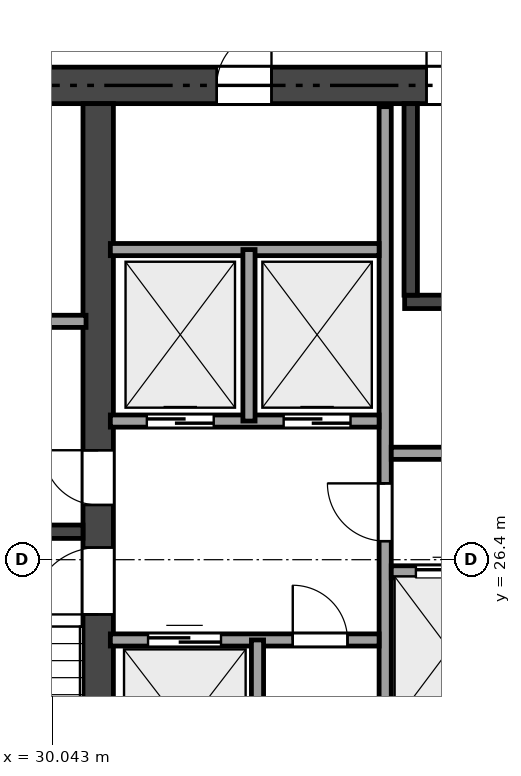
"""IFC4 building model, lengths in metres.
Left out: names, types, materials, properties, quantities, classifications, styles, units other than length and angle.
Written with IfcOpenShell. Run it as: python <this file> out.ifc"""

import sys

from ifc_helpers import new_model, si_unit, direction, frame, frame_2d, origin, place, context, subcontext, project, spatial, rectangle, extrude, element, fill, save


model = new_model("IFC4")
c1 = context("Model", 3, precision=1e-05, world=origin(), true_north=direction((0.0, 1.0)))
c2 = subcontext(c1, "Body", "Model", "MODEL_VIEW")
j1 = project(units=[si_unit("LENGTHUNIT", "METRE"), si_unit("PLANEANGLEUNIT", "RADIAN")], contexts=[c1])
p1 = place(None, origin())
s1 = spatial("IfcSite", under=j1, at=p1, CompositionType="ELEMENT")
p2 = place(p1, origin())
s2 = spatial("IfcBuilding", under=s1, at=p2, CompositionType="ELEMENT")
p3 = place(p2, frame((0.0, 0.0, 125.7)))
s3 = spatial("IfcBuildingStorey", under=s2, at=p3, CompositionType="ELEMENT", Elevation=125.7)
p4 = place(p3, frame((26.5, 34.2, 0.0), z_axis=(0.0, 0.0, 1.0), x_axis=(1.0, 0.0, 0.0)))
e1 = element("IfcWall", 1, at=p4, inside=s3, PredefinedType="SHEAR", context=c2, shape_type="SweptSolid", body=[
    extrude(rectangle(XDim=21.4, YDim=0.6, at=frame_2d((10.7, 0.0))), origin(), (0.0, 0.0, 1.0), 3.32),
])
p5 = place(p4, frame((9.7, 0.0, 0.0)))
e2 = element("IfcOpeningElement", 2, at=p5, cuts=e1, PredefinedType="OPENING", context=c2, shape_type="SweptSolid", body=[
    extrude(rectangle(XDim=1.1, YDim=2.15, at=frame_2d((0.55, 1.075))), frame((0.0, 0.31, 0.0), z_axis=(0.0, -1.0, 0.0), x_axis=(1.0, 0.0, 0.0)), (0.0, 0.0, 1.0), 0.62),
])
p6 = place(p4, frame((1.95, 0.0, 0.0)))
e3 = element("IfcOpeningElement", 3, at=p6, cuts=e1, PredefinedType="OPENING", context=c2, shape_type="SweptSolid", body=[
    extrude(rectangle(XDim=0.9, YDim=2.1, at=frame_2d((0.45, 1.05))), frame((0.0, 0.31, 0.0), z_axis=(0.0, -1.0, 0.0), x_axis=(1.0, 0.0, 0.0)), (0.0, 0.0, 1.0), 0.62),
])
p7 = place(p4, frame((6.25, 0.0, 0.0)))
e4 = element("IfcOpeningElement", 4, at=p7, cuts=e1, PredefinedType="OPENING", context=c2, shape_type="SweptSolid", body=[
    extrude(rectangle(XDim=0.9, YDim=2.1, at=frame_2d((0.45, 1.05))), frame((0.0, 0.31, 0.0), z_axis=(0.0, -1.0, 0.0), x_axis=(1.0, 0.0, 0.0)), (0.0, 0.0, 1.0), 0.62),
])
p8 = place(p3, frame((30.8, 18.9, 0.0), z_axis=(0.0, 0.0, 1.0), x_axis=(0.0, 1.0, 0.0)))
e5 = element("IfcWall", 5, at=p8, inside=s3, PredefinedType="SHEAR", context=c2, shape_type="SweptSolid", body=[
    extrude(rectangle(XDim=15.0, YDim=0.5, at=frame_2d((7.5, 0.0))), origin(), (0.0, 0.0, 1.0), 3.32),
])
p9 = place(p8, frame((6.6, 0.0, 0.0)))
e6 = element("IfcOpeningElement", 6, at=p9, cuts=e5, PredefinedType="OPENING", context=c2, shape_type="SweptSolid", body=[
    extrude(rectangle(XDim=1.1, YDim=2.15, at=frame_2d((0.55, 1.075))), frame((0.0, 0.26, 0.0), z_axis=(0.0, -1.0, 0.0), x_axis=(1.0, 0.0, 0.0)), (0.0, 0.0, 1.0), 0.52),
])
p10 = place(p8, frame((8.4, 0.0, 0.0)))
e7 = element("IfcOpeningElement", 7, at=p10, cuts=e5, PredefinedType="OPENING", context=c2, shape_type="SweptSolid", body=[
    extrude(rectangle(XDim=0.9, YDim=2.1, at=frame_2d((0.45, 1.05))), frame((0.0, 0.26, 0.0), z_axis=(0.0, -1.0, 0.0), x_axis=(1.0, 0.0, 0.0)), (0.0, 0.0, 1.0), 0.52),
])
p11 = place(p3, frame((27.1, 26.86, 0.0), z_axis=(0.0, 0.0, 1.0), x_axis=(1.0, 0.0, 0.0)))
e8 = element("IfcWall", 8, at=p11, inside=s3, PredefinedType="SHEAR", context=c2, shape_type="SweptSolid", body=[
    extrude(rectangle(XDim=3.45, YDim=0.22, at=frame_2d((1.725, 0.0))), origin(), (0.0, 0.0, 1.0), 3.32),
])
p12 = place(p3, frame((35.84, 30.64, 0.0), z_axis=(0.0, 0.0, 1.0), x_axis=(1.0, 0.0, 0.0)))
e9 = element("IfcWall", 9, at=p12, inside=s3, PredefinedType="SHEAR", context=c2, shape_type="SweptSolid", body=[
    extrude(rectangle(XDim=7.61, YDim=0.22, at=frame_2d((3.805, 0.0))), origin(), (0.0, 0.0, 1.0), 3.32),
])
p13 = place(p3, frame((35.94, 30.75, 0.0), z_axis=(0.0, 0.0, 1.0), x_axis=(0.0, 1.0, 0.0)))
e10 = element("IfcWall", 10, at=p13, inside=s3, PredefinedType="SHEAR", context=c2, shape_type="SweptSolid", body=[
    extrude(rectangle(XDim=3.15, YDim=0.22, at=frame_2d((1.575, 0.0))), origin(), (0.0, 0.0, 1.0), 3.32),
])
p14 = place(p3, frame((27.15, 30.32, 0.0), z_axis=(0.0, 0.0, 1.0), x_axis=(1.0, 0.0, 0.0)))
e11 = element("IfcWall", 11, at=p14, inside=s3, PredefinedType="SOLIDWALL", context=c2, shape_type="SweptSolid", body=[
    extrude(rectangle(XDim=3.45, YDim=0.2, at=frame_2d((1.725, 0.0))), origin(), (0.0, 0.0, 1.0), 3.32),
])
p15 = place(p3, frame((35.52, 18.95, 0.0), z_axis=(0.0, 0.0, 1.0), x_axis=(0.0, 1.0, 0.0)))
e12 = element("IfcWall", 12, at=p15, inside=s3, PredefinedType="SOLIDWALL", context=c2, shape_type="SweptSolid", body=[
    extrude(rectangle(XDim=14.9, YDim=0.2, at=frame_2d((7.45, 0.0))), origin(), (0.0, 0.0, 1.0), 2.841),
])
p16 = place(p15, frame((7.755, 0.0, 0.0)))
e13 = element("IfcOpeningElement", 13, at=p16, cuts=e12, PredefinedType="OPENING", context=c2, shape_type="SweptSolid", body=[
    extrude(rectangle(XDim=0.95, YDim=2.15, at=frame_2d((0.475, 1.075))), frame((0.0, 0.11, 0.0), z_axis=(0.0, -1.0, 0.0), x_axis=(1.0, 0.0, 0.0)), (0.0, 0.0, 1.0), 0.22),
])
p17 = place(p15, frame((0.6, 0.0, 0.0)))
e14 = element("IfcOpeningElement", 14, at=p17, cuts=e12, PredefinedType="OPENING", context=c2, shape_type="SweptSolid", body=[
    extrude(rectangle(XDim=0.9, YDim=2.1, at=frame_2d((0.45, 1.05))), frame((0.0, 0.11, 0.0), z_axis=(0.0, -1.0, 0.0), x_axis=(1.0, 0.0, 0.0)), (0.0, 0.0, 1.0), 0.22),
])
p18 = place(p3, frame((31.0, 28.68, 0.0), z_axis=(0.0, 0.0, 1.0), x_axis=(1.0, 0.0, 0.0)))
e15 = element("IfcWall", 15, at=p18, inside=s3, PredefinedType="SOLIDWALL", context=c2, shape_type="SweptSolid", body=[
    extrude(rectangle(XDim=4.42, YDim=0.2, at=frame_2d((2.21, 0.0))), origin(), (0.0, 0.0, 1.0), 3.32),
])
p19 = place(p18, frame((0.6, 0.0, 0.0)))
e16 = element("IfcOpeningElement", 16, at=p19, cuts=e15, PredefinedType="OPENING", context=c2, shape_type="SweptSolid", body=[
    extrude(rectangle(XDim=1.1, YDim=2.15, at=frame_2d((0.55, 1.075))), frame((0.0, 0.11, 0.0), z_axis=(0.0, -1.0, 0.0), x_axis=(1.0, 0.0, 0.0)), (0.0, 0.0, 1.0), 0.22),
])
p20 = place(p18, frame((2.85, 0.0, 0.0)))
e17 = element("IfcOpeningElement", 17, at=p20, cuts=e15, PredefinedType="OPENING", context=c2, shape_type="SweptSolid", body=[
    extrude(rectangle(XDim=1.1, YDim=2.15, at=frame_2d((0.55, 1.075))), frame((0.0, 0.11, 0.0), z_axis=(0.0, -1.0, 0.0), x_axis=(1.0, 0.0, 0.0)), (0.0, 0.0, 1.0), 0.22),
])
p21 = place(p3, frame((31.0, 31.5, 0.0), z_axis=(0.0, 0.0, 1.0), x_axis=(1.0, 0.0, 0.0)))
e18 = element("IfcWall", 18, at=p21, inside=s3, PredefinedType="SOLIDWALL", context=c2, shape_type="SweptSolid", body=[
    extrude(rectangle(XDim=4.42, YDim=0.2, at=frame_2d((2.21, 0.0))), origin(), (0.0, 0.0, 1.0), 3.32),
])
p22 = place(p3, frame((33.28, 28.68, 0.0), z_axis=(0.0, 0.0, 1.0), x_axis=(0.0, 1.0, 0.0)))
e19 = element("IfcWall", 19, at=p22, inside=s3, PredefinedType="SOLIDWALL", context=c2, shape_type="SweptSolid", body=[
    extrude(rectangle(XDim=2.82, YDim=0.2, at=frame_2d((1.41, 0.0))), origin(), (0.0, 0.0, 1.0), 3.32),
])
p23 = place(p3, frame((31.0, 25.08, 0.0), z_axis=(0.0, 0.0, 1.0), x_axis=(1.0, 0.0, 0.0)))
e20 = element("IfcWall", 20, at=p23, inside=s3, PredefinedType="SOLIDWALL", context=c2, shape_type="SweptSolid", body=[
    extrude(rectangle(XDim=4.42, YDim=0.2, at=frame_2d((2.21, 0.0))), origin(), (0.0, 0.0, 1.0), 3.32),
])
p24 = place(p23, frame((3.0, 0.0, 0.0)))
e21 = element("IfcOpeningElement", 21, at=p24, cuts=e20, PredefinedType="OPENING", context=c2, shape_type="SweptSolid", body=[
    extrude(rectangle(XDim=0.9, YDim=2.1, at=frame_2d((0.45, 1.05))), frame((0.0, 0.11, 0.0), z_axis=(0.0, -1.0, 0.0), x_axis=(1.0, 0.0, 0.0)), (0.0, 0.0, 1.0), 0.22),
])
p25 = place(p23, frame((0.62, 0.0, 0.0)))
e22 = element("IfcOpeningElement", 22, at=p25, cuts=e20, PredefinedType="OPENING", context=c2, shape_type="SweptSolid", body=[
    extrude(rectangle(XDim=1.2, YDim=2.15, at=frame_2d((0.6, 1.075))), frame((0.0, 0.11, 0.0), z_axis=(0.0, -1.0, 0.0), x_axis=(1.0, 0.0, 0.0)), (0.0, 0.0, 1.0), 0.22),
])
p26 = place(p3, frame((33.42, 18.95, 0.0), z_axis=(0.0, 0.0, 1.0), x_axis=(0.0, 1.0, 0.0)))
e23 = element("IfcWall", 23, at=p26, inside=s3, PredefinedType="SOLIDWALL", context=c2, shape_type="SweptSolid", body=[
    extrude(rectangle(XDim=6.13, YDim=0.2, at=frame_2d((3.065, 0.0))), origin(), (0.0, 0.0, 1.0), 2.841),
])
p27 = place(p3, frame((35.62, 28.15, 0.0), z_axis=(0.0, 0.0, 1.0), x_axis=(1.0, 0.0, 0.0)))
e24 = element("IfcWall", 24, at=p27, inside=s3, PredefinedType="SOLIDWALL", context=c2, shape_type="SweptSolid", body=[
    extrude(rectangle(XDim=7.88, YDim=0.2, at=frame_2d((3.94, 0.0))), origin(), (0.0, 0.0, 1.0), 3.32),
])
p28 = place(p3, frame((35.62, 26.2, 0.0), z_axis=(0.0, 0.0, 1.0), x_axis=(1.0, 0.0, 0.0)))
e25 = element("IfcWall", 25, at=p28, inside=s3, PredefinedType="SOLIDWALL", context=c2, shape_type="SweptSolid", body=[
    extrude(rectangle(XDim=7.88, YDim=0.2, at=frame_2d((3.94, 0.0))), origin(), (0.0, 0.0, 1.0), 3.32),
])
p29 = place(p28, frame((0.405, 0.0, 0.0)))
e26 = element("IfcOpeningElement", 26, at=p29, cuts=e25, PredefinedType="OPENING", context=c2, shape_type="SweptSolid", body=[
    extrude(rectangle(XDim=1.1, YDim=2.15, at=frame_2d((0.55, 1.075))), frame((0.0, 0.11, 0.0), z_axis=(0.0, -1.0, 0.0), x_axis=(1.0, 0.0, 0.0)), (0.0, 0.0, 1.0), 0.22),
])
p30 = place(p28, frame((2.355, 0.0, 0.0)))
e27 = element("IfcOpeningElement", 27, at=p30, cuts=e25, PredefinedType="OPENING", context=c2, shape_type="SweptSolid", body=[
    extrude(rectangle(XDim=1.1, YDim=2.15, at=frame_2d((0.55, 1.075))), frame((0.0, 0.11, 0.0), z_axis=(0.0, -1.0, 0.0), x_axis=(1.0, 0.0, 0.0)), (0.0, 0.0, 1.0), 0.22),
])
p31 = place(p28, frame((4.305, 0.0, 0.0)))
e28 = element("IfcOpeningElement", 28, at=p31, cuts=e25, PredefinedType="OPENING", context=c2, shape_type="SweptSolid", body=[
    extrude(rectangle(XDim=1.1, YDim=2.15, at=frame_2d((0.55, 1.075))), frame((0.0, 0.11, 0.0), z_axis=(0.0, -1.0, 0.0), x_axis=(1.0, 0.0, 0.0)), (0.0, 0.0, 1.0), 0.22),
])
p32 = place(p28, frame((6.255, 0.0, 0.0)))
e29 = element("IfcOpeningElement", 29, at=p32, cuts=e25, PredefinedType="OPENING", context=c2, shape_type="SweptSolid", body=[
    extrude(rectangle(XDim=1.1, YDim=2.15, at=frame_2d((0.55, 1.075))), frame((0.0, 0.11, 0.0), z_axis=(0.0, -1.0, 0.0), x_axis=(1.0, 0.0, 0.0)), (0.0, 0.0, 1.0), 0.22),
])
p33 = place(p9, origin())
e30 = element("IfcDoor", 30, at=p33, inside=s3, OperationType="SINGLE_SWING_LEFT", PredefinedType="DOOR", context=c2, shape_type="SweptSolid", body=[
    extrude(rectangle(XDim=1.1, YDim=2.15, at=frame_2d((0.55, 1.075))), frame((0.0, 0.025, 0.0), z_axis=(0.0, -1.0, 0.0), x_axis=(1.0, 0.0, 0.0)), (0.0, 0.0, 1.0), 0.05),
])
fill(e6, e30)
p34 = place(p5, origin())
e31 = element("IfcDoor", 31, at=p34, inside=s3, OperationType="SINGLE_SWING_LEFT", PredefinedType="DOOR", context=c2, shape_type="SweptSolid", body=[
    extrude(rectangle(XDim=1.1, YDim=2.15, at=frame_2d((0.55, 1.075))), frame((0.0, 0.025, 0.0), z_axis=(0.0, -1.0, 0.0), x_axis=(1.0, 0.0, 0.0)), (0.0, 0.0, 1.0), 0.05),
])
fill(e2, e31)
p35 = place(p16, origin())
e32 = element("IfcDoor", 32, at=p35, inside=s3, OperationType="SINGLE_SWING_RIGHT", PredefinedType="DOOR", context=c2, shape_type="SweptSolid", body=[
    extrude(rectangle(XDim=0.95, YDim=2.15, at=frame_2d((0.475, 1.075))), frame((0.0, 0.025, 0.0), z_axis=(0.0, -1.0, 0.0), x_axis=(1.0, 0.0, 0.0)), (0.0, 0.0, 1.0), 0.05),
])
fill(e13, e32)
p36 = place(p10, origin())
e33 = element("IfcDoor", 33, at=p36, inside=s3, OperationType="SINGLE_SWING_RIGHT", PredefinedType="DOOR", context=c2, shape_type="SweptSolid", body=[
    extrude(rectangle(XDim=0.9, YDim=2.1, at=frame_2d((0.45, 1.05))), frame((0.0, 0.025, 0.0), z_axis=(0.0, -1.0, 0.0), x_axis=(1.0, 0.0, 0.0)), (0.0, 0.0, 1.0), 0.05),
])
fill(e7, e33)
p37 = place(p7, origin())
e34 = element("IfcDoor", 34, at=p37, inside=s3, OperationType="SINGLE_SWING_RIGHT", PredefinedType="DOOR", context=c2, shape_type="SweptSolid", body=[
    extrude(rectangle(XDim=0.9, YDim=2.1, at=frame_2d((0.45, 1.05))), frame((0.0, 0.025, 0.0), z_axis=(0.0, -1.0, 0.0), x_axis=(1.0, 0.0, 0.0)), (0.0, 0.0, 1.0), 0.05),
])
fill(e4, e34)
p38 = place(p24, origin())
e35 = element("IfcDoor", 35, at=p38, inside=s3, OperationType="SINGLE_SWING_LEFT", PredefinedType="DOOR", context=c2, shape_type="SweptSolid", body=[
    extrude(rectangle(XDim=0.9, YDim=2.1, at=frame_2d((0.45, 1.05))), frame((0.0, 0.025, 0.0), z_axis=(0.0, -1.0, 0.0), x_axis=(1.0, 0.0, 0.0)), (0.0, 0.0, 1.0), 0.05),
])
fill(e21, e35)
p39 = place(p19, origin())
e36 = element("IfcDoor", 36, at=p39, inside=s3, OperationType="SLIDING_TO_LEFT", PredefinedType="DOOR", context=c2, shape_type="SweptSolid", body=[
    extrude(rectangle(XDim=1.1, YDim=2.15, at=frame_2d((0.55, 1.075))), frame((0.0, 0.025, 0.0), z_axis=(0.0, -1.0, 0.0), x_axis=(1.0, 0.0, 0.0)), (0.0, 0.0, 1.0), 0.05),
])
fill(e16, e36)
p40 = place(p20, origin())
e37 = element("IfcDoor", 37, at=p40, inside=s3, OperationType="SLIDING_TO_LEFT", PredefinedType="DOOR", context=c2, shape_type="SweptSolid", body=[
    extrude(rectangle(XDim=1.1, YDim=2.15, at=frame_2d((0.55, 1.075))), frame((0.0, 0.025, 0.0), z_axis=(0.0, -1.0, 0.0), x_axis=(1.0, 0.0, 0.0)), (0.0, 0.0, 1.0), 0.05),
])
fill(e17, e37)
p41 = place(p25, origin())
e38 = element("IfcDoor", 38, at=p41, inside=s3, OperationType="SLIDING_TO_LEFT", PredefinedType="DOOR", context=c2, shape_type="SweptSolid", body=[
    extrude(rectangle(XDim=1.2, YDim=2.15, at=frame_2d((0.6, 1.075))), frame((0.0, 0.025, 0.0), z_axis=(0.0, -1.0, 0.0), x_axis=(1.0, 0.0, 0.0)), (0.0, 0.0, 1.0), 0.05),
])
fill(e22, e38)
p42 = place(p29, origin())
e39 = element("IfcDoor", 39, at=p42, inside=s3, OperationType="SLIDING_TO_LEFT", PredefinedType="DOOR", context=c2, shape_type="SweptSolid", body=[
    extrude(rectangle(XDim=1.1, YDim=2.15, at=frame_2d((0.55, 1.075))), frame((0.0, 0.025, 0.0), z_axis=(0.0, -1.0, 0.0), x_axis=(1.0, 0.0, 0.0)), (0.0, 0.0, 1.0), 0.05),
])
fill(e26, e39)
save(model, sys.argv[1])
